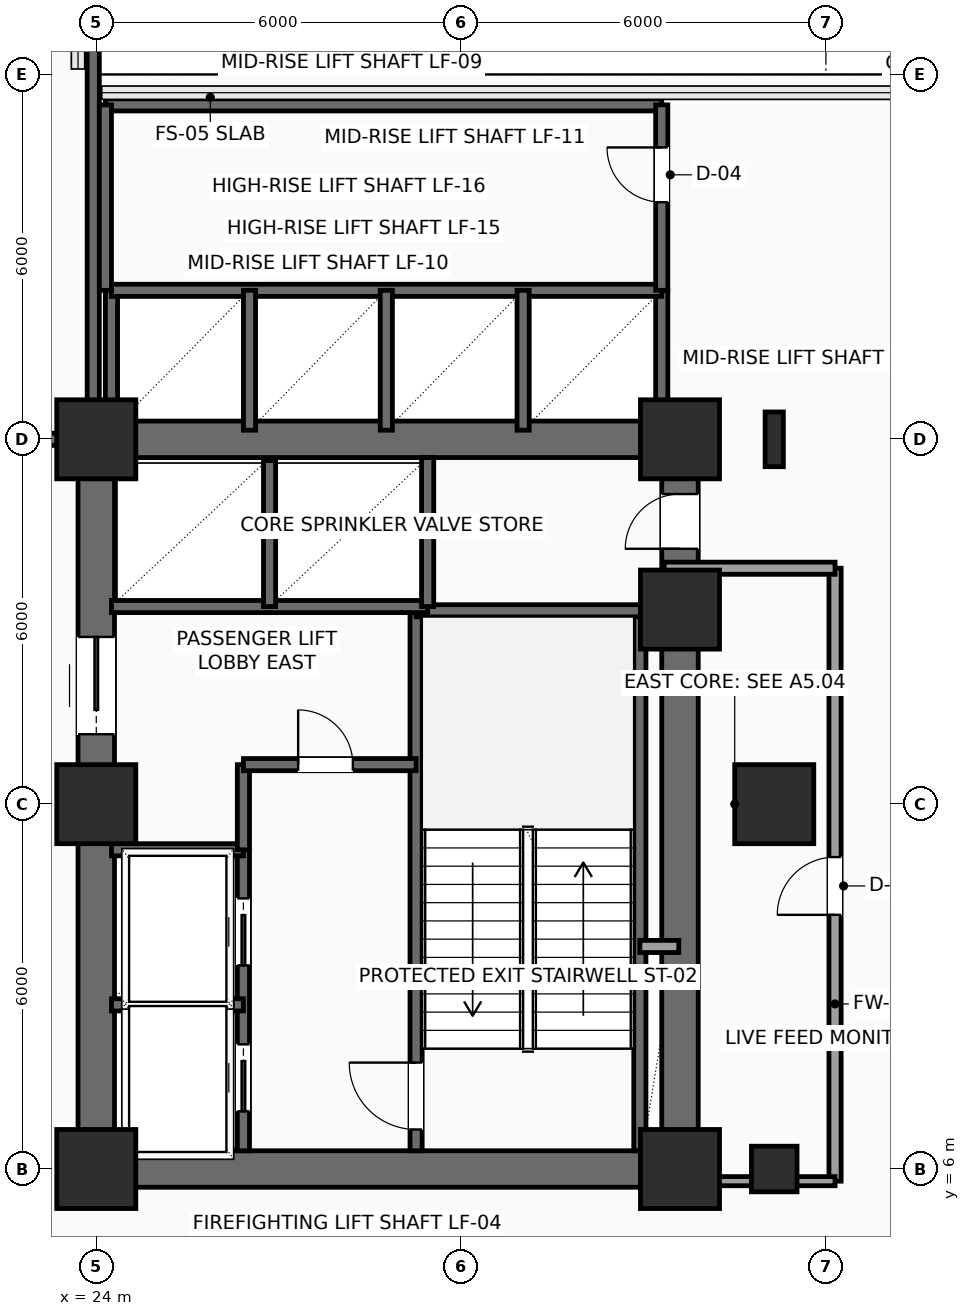
"""IFC4 building model, lengths in metres.
Left out: names, types, materials, properties, quantities, classifications, styles, units other than length and angle.
Written with IfcOpenShell. Run it as: python <this file> out.ifc"""

import sys

from ifc_helpers import new_model, si_unit, direction, frame, frame_2d, origin, origin_2d, place, context, subcontext, project, spatial, rectangle, hollow_rectangle, i_section, extrude, element, fill, save


model = new_model("IFC4")
c1 = context("Model", 3, precision=1e-05, world=origin(), true_north=direction((0.0, 1.0)))
c2 = subcontext(c1, "Body", "Model", "MODEL_VIEW")
j1 = project(units=[si_unit("LENGTHUNIT", "METRE"), si_unit("PLANEANGLEUNIT", "RADIAN")], contexts=[c1])
p1 = place(None, origin())
s1 = spatial("IfcSite", under=j1, at=p1, CompositionType="ELEMENT")
p2 = place(p1, origin())
s2 = spatial("IfcBuilding", under=s1, at=p2, CompositionType="ELEMENT")
p3 = place(p2, frame((0.0, 0.0, 63.6)))
s3 = spatial("IfcBuildingStorey", under=s2, at=p3, CompositionType="ELEMENT", Elevation=63.6)
for number, where, z_axis, x_axis in (
    (1, (24.0, 6.0, 0.0), (0.0, 0.0, 1.0), (1.0, 0.0, 0.0)),
    (2, (24.0, 12.0, 0.0), (0.0, 0.0, 1.0), (1.0, 0.0, 0.0)),
    (3, (24.0, 18.0, 0.0), (0.0, 0.0, 1.0), (1.0, 0.0, 0.0)),
    (4, (33.6, 6.0, 0.0), (0.0, 0.0, 1.0), (1.0, 0.0, 0.0)),
    (5, (33.6, 15.2, 0.0), (0.0, 0.0, 1.0), (1.0, 0.0, 0.0)),
    (6, (33.6, 18.0, 0.0), (0.0, 0.0, 1.0), (1.0, 0.0, 0.0)),
):
    element("IfcColumn", number, at=place(p3, frame(where, z_axis=z_axis, x_axis=x_axis)), inside=s3, PredefinedType="COLUMN", context=c2, shape_type="SweptSolid", body=[
        extrude(rectangle(XDim=1.3, YDim=1.3, at=origin_2d()), origin(), (0.0, 0.0, 1.0), 3.9),
    ])
p4 = place(p3, frame((35.15, 6.0, 0.0), z_axis=(0.0, 0.0, 1.0), x_axis=(1.0, 0.0, 0.0)))
e7 = element("IfcColumn", 7, at=p4, inside=s3, PredefinedType="COLUMN", context=c2, shape_type="SweptSolid", body=[
    extrude(hollow_rectangle(XDim=0.75, YDim=0.75, WallThickness=0.035, InnerFilletRadius=0.035, OuterFilletRadius=0.05, at=origin_2d()), origin(), (0.0, 0.0, 1.0), 3.9),
])
p5 = place(p3, frame((35.15, 12.0, 0.0), z_axis=(0.0, 0.0, 1.0), x_axis=(1.0, 0.0, 0.0)))
e8 = element("IfcColumn", 8, at=p5, inside=s3, PredefinedType="COLUMN", context=c2, shape_type="SweptSolid", body=[
    extrude(rectangle(XDim=1.3, YDim=1.3, at=origin_2d()), origin(), (0.0, 0.0, 1.0), 3.9),
])
p6 = place(p3, frame((35.15, 18.0, 0.0), z_axis=(0.0, 0.0, 1.0), x_axis=(1.0, 0.0, 0.0)))
e9 = element("IfcColumn", 9, at=p6, inside=s3, PredefinedType="COLUMN", context=c2, shape_type="SweptSolid", body=[
    extrude(i_section(OverallWidth=0.3, OverallDepth=0.9, WebThickness=0.019, FlangeThickness=0.035, FilletRadius=0.03, at=origin_2d()), origin(), (0.0, 0.0, 1.0), 3.9),
])
for number, where, z_axis, x_axis in (
    (10, (24.0, 6.0, 0.0), (0.0, 0.0, 1.0), (1.0, 0.0, 0.0)),
    (11, (24.0, 18.0, 0.0), (0.0, 0.0, 1.0), (1.0, 0.0, 0.0)),
):
    element("IfcWall", number, at=place(p3, frame(where, z_axis=z_axis, x_axis=x_axis)), inside=s3, PredefinedType="SHEAR", context=c2, shape_type="SweptSolid", body=[
        extrude(rectangle(XDim=9.6, YDim=0.6, at=frame_2d((4.8, 0.0))), origin(), (0.0, 0.0, 1.0), 3.65),
    ])
p7 = place(p3, frame((24.0, 6.0, 0.0), z_axis=(0.0, 0.0, 1.0), x_axis=(0.0, 1.0, 0.0)))
e12 = element("IfcWall", 12, at=p7, inside=s3, PredefinedType="SHEAR", context=c2, shape_type="SweptSolid", body=[
    extrude(rectangle(XDim=12.0, YDim=0.6, at=frame_2d((6.0, 0.0))), origin(), (0.0, 0.0, 1.0), 3.65),
])
p8 = place(p7, frame((7.15, 0.0, 0.0)))
e13 = element("IfcOpeningElement", 13, at=p8, cuts=e12, PredefinedType="OPENING", context=c2, shape_type="SweptSolid", body=[
    extrude(rectangle(XDim=1.6, YDim=2.3, at=frame_2d((0.8, 1.15))), frame((0.0, 0.31, 0.0), z_axis=(0.0, -1.0, 0.0), x_axis=(1.0, 0.0, 0.0)), (0.0, 0.0, 1.0), 0.62),
])
p9 = place(p3, frame((33.6, 6.0, 0.0), z_axis=(0.0, 0.0, 1.0), x_axis=(0.0, 1.0, 0.0)))
e14 = element("IfcWall", 14, at=p9, inside=s3, PredefinedType="SHEAR", context=c2, shape_type="SweptSolid", body=[
    extrude(rectangle(XDim=12.0, YDim=0.6, at=frame_2d((6.0, 0.0))), origin(), (0.0, 0.0, 1.0), 3.65),
])
p10 = place(p9, frame((10.2, 0.0, 0.0)))
e15 = element("IfcOpeningElement", 15, at=p10, cuts=e14, PredefinedType="OPENING", context=c2, shape_type="SweptSolid", body=[
    extrude(rectangle(XDim=0.9, YDim=2.15, at=frame_2d((0.45, 1.075))), frame((0.0, 0.31, 0.0), z_axis=(0.0, -1.0, 0.0), x_axis=(1.0, 0.0, 0.0)), (0.0, 0.0, 1.0), 0.62),
])
p11 = place(p3, frame((29.26, 6.3, 0.0), z_axis=(0.0, 0.0, 1.0), x_axis=(0.0, 1.0, 0.0)))
e16 = element("IfcWall", 16, at=p11, inside=s3, PredefinedType="SHEAR", context=c2, shape_type="SweptSolid", body=[
    extrude(rectangle(XDim=8.88, YDim=0.2, at=frame_2d((4.44, 0.0))), origin(), (0.0, 0.0, 1.0), 3.65),
])
p12 = place(p11, frame((0.35, 0.0, 0.0)))
e17 = element("IfcOpeningElement", 17, at=p12, cuts=e16, PredefinedType="OPENING", context=c2, shape_type="SweptSolid", body=[
    extrude(rectangle(XDim=1.1, YDim=2.2, at=frame_2d((0.55, 1.1))), frame((0.0, 0.11, 0.0), z_axis=(0.0, -1.0, 0.0), x_axis=(1.0, 0.0, 0.0)), (0.0, 0.0, 1.0), 0.22),
])
p13 = place(p3, frame((32.94, 6.3, 0.0), z_axis=(0.0, 0.0, 1.0), x_axis=(0.0, 1.0, 0.0)))
e18 = element("IfcWall", 18, at=p13, inside=s3, PredefinedType="SHEAR", context=c2, shape_type="SweptSolid", body=[
    extrude(rectangle(XDim=8.88, YDim=0.2, at=frame_2d((4.44, 0.0))), origin(), (0.0, 0.0, 1.0), 3.65),
])
p14 = place(p3, frame((29.26, 15.18, 0.0), z_axis=(0.0, 0.0, 1.0), x_axis=(1.0, 0.0, 0.0)))
e19 = element("IfcWall", 19, at=p14, inside=s3, PredefinedType="SHEAR", context=c2, shape_type="SweptSolid", body=[
    extrude(rectangle(XDim=4.04, YDim=0.2, at=frame_2d((2.02, 0.0))), origin(), (0.0, 0.0, 1.0), 3.65),
])
p15 = place(p3, frame((26.42, 6.3, 0.0), z_axis=(0.0, 0.0, 1.0), x_axis=(0.0, 1.0, 0.0)))
e20 = element("IfcWall", 20, at=p15, inside=s3, PredefinedType="SHEAR", context=c2, shape_type="SweptSolid", body=[
    extrude(rectangle(XDim=4.95, YDim=0.2, at=frame_2d((2.475, 0.0))), origin(), (0.0, 0.0, 1.0), 3.65),
])
p16 = place(p15, frame((0.65, 0.0, 0.0)))
e21 = element("IfcOpeningElement", 21, at=p16, cuts=e20, PredefinedType="OPENING", context=c2, shape_type="SweptSolid", body=[
    extrude(rectangle(XDim=1.1, YDim=2.2, at=frame_2d((0.55, 1.1))), frame((0.0, 0.11, 0.0), z_axis=(0.0, -1.0, 0.0), x_axis=(1.0, 0.0, 0.0)), (0.0, 0.0, 1.0), 0.22),
])
p17 = place(p15, frame((3.05, 0.0, 0.0)))
e22 = element("IfcOpeningElement", 22, at=p17, cuts=e20, PredefinedType="OPENING", context=c2, shape_type="SweptSolid", body=[
    extrude(rectangle(XDim=1.1, YDim=2.2, at=frame_2d((0.55, 1.1))), frame((0.0, 0.11, 0.0), z_axis=(0.0, -1.0, 0.0), x_axis=(1.0, 0.0, 0.0)), (0.0, 0.0, 1.0), 0.22),
])
for number, where, z_axis, x_axis in (
    (23, (24.25, 8.7, 0.0), (0.0, 0.0, 1.0), (1.0, 0.0, 0.0)),
    (24, (24.25, 11.25, 0.0), (0.0, 0.0, 1.0), (1.0, 0.0, 0.0)),
):
    element("IfcWall", number, at=place(p3, frame(where, z_axis=z_axis, x_axis=x_axis)), inside=s3, PredefinedType="SHEAR", context=c2, shape_type="SweptSolid", body=[
        extrude(rectangle(XDim=2.17, YDim=0.2, at=frame_2d((1.085, 0.0))), origin(), (0.0, 0.0, 1.0), 3.65),
    ])
p18 = place(p3, frame((26.42, 11.25, 0.0), z_axis=(0.0, 0.0, 1.0), x_axis=(0.0, 1.0, 0.0)))
e25 = element("IfcWall", 25, at=p18, inside=s3, PredefinedType="SHEAR", context=c2, shape_type="SweptSolid", body=[
    extrude(rectangle(XDim=1.4, YDim=0.2, at=frame_2d((0.7, 0.0))), origin(), (0.0, 0.0, 1.0), 3.65),
])
p19 = place(p3, frame((26.42, 12.65, 0.0), z_axis=(0.0, 0.0, 1.0), x_axis=(1.0, 0.0, 0.0)))
e26 = element("IfcWall", 26, at=p19, inside=s3, PredefinedType="SHEAR", context=c2, shape_type="SweptSolid", body=[
    extrude(rectangle(XDim=2.84, YDim=0.2, at=frame_2d((1.42, 0.0))), origin(), (0.0, 0.0, 1.0), 3.65),
])
p20 = place(p19, frame((0.9, 0.0, 0.0)))
e27 = element("IfcOpeningElement", 27, at=p20, cuts=e26, PredefinedType="OPENING", context=c2, shape_type="SweptSolid", body=[
    extrude(rectangle(XDim=0.9, YDim=2.15, at=frame_2d((0.45, 1.075))), frame((0.0, 0.11, 0.0), z_axis=(0.0, -1.0, 0.0), x_axis=(1.0, 0.0, 0.0)), (0.0, 0.0, 1.0), 0.22),
])
p21 = place(p3, frame((32.94, 9.66, 0.0), z_axis=(0.0, 0.0, 1.0), x_axis=(1.0, 0.0, 0.0)))
e28 = element("IfcWall", 28, at=p21, inside=s3, PredefinedType="SOLIDWALL", context=c2, shape_type="SweptSolid", body=[
    extrude(rectangle(XDim=0.64, YDim=0.2, at=frame_2d((0.32, 0.0))), origin(), (0.0, 0.0, 1.0), 3.65),
])
p22 = place(p3, frame((24.25, 15.25, 0.0), z_axis=(0.0, 0.0, 1.0), x_axis=(1.0, 0.0, 0.0)))
e29 = element("IfcWall", 29, at=p22, inside=s3, PredefinedType="SHEAR", context=c2, shape_type="SweptSolid", body=[
    extrude(rectangle(XDim=5.2, YDim=0.2, at=frame_2d((2.6, 0.0))), origin(), (0.0, 0.0, 1.0), 3.65),
])
p23 = place(p3, frame((26.85, 15.25, 0.0), z_axis=(0.0, 0.0, 1.0), x_axis=(0.0, 1.0, 0.0)))
e30 = element("IfcWall", 30, at=p23, inside=s3, PredefinedType="SHEAR", context=c2, shape_type="SweptSolid", body=[
    extrude(rectangle(XDim=2.4, YDim=0.2, at=frame_2d((1.2, 0.0))), origin(), (0.0, 0.0, 1.0), 3.65),
])
p24 = place(p3, frame((29.45, 15.25, 0.0), z_axis=(0.0, 0.0, 1.0), x_axis=(0.0, 1.0, 0.0)))
e31 = element("IfcWall", 31, at=p24, inside=s3, PredefinedType="SHEAR", context=c2, shape_type="SweptSolid", body=[
    extrude(rectangle(XDim=2.45, YDim=0.2, at=frame_2d((1.225, 0.0))), origin(), (0.0, 0.0, 1.0), 3.65),
])
p25 = place(p3, frame((20.45, 18.0, 0.0), z_axis=(0.0, 0.0, 1.0), x_axis=(1.0, 0.0, 0.0)))
e32 = element("IfcWall", 32, at=p25, inside=s3, PredefinedType="SHEAR", context=c2, shape_type="SweptSolid", body=[
    extrude(rectangle(XDim=3.5, YDim=0.2, at=frame_2d((1.75, 0.0))), origin(), (0.0, 0.0, 1.0), 3.65),
])
p26 = place(p25, frame((0.95, 0.0, 0.0)))
e33 = element("IfcOpeningElement", 33, at=p26, cuts=e32, PredefinedType="OPENING", context=c2, shape_type="SweptSolid", body=[
    extrude(rectangle(XDim=1.6, YDim=2.3, at=frame_2d((0.8, 1.15))), frame((0.0, 0.11, 0.0), z_axis=(0.0, -1.0, 0.0), x_axis=(1.0, 0.0, 0.0)), (0.0, 0.0, 1.0), 0.22),
])
p27 = place(p3, frame((23.95, 18.0, 0.0), z_axis=(0.0, 0.0, 1.0), x_axis=(0.0, 1.0, 0.0)))
e34 = element("IfcWall", 34, at=p27, inside=s3, PredefinedType="SHEAR", context=c2, shape_type="SweptSolid", body=[
    extrude(rectangle(XDim=9.3, YDim=0.2, at=frame_2d((4.65, 0.0))), origin(), (0.0, 0.0, 1.0), 3.65),
])
for number, where, z_axis, x_axis in (
    (35, (33.3, 18.1, 0.0), (0.0, 0.0, 1.0), (0.0, 1.0, 0.0)),
    (36, (24.25, 18.1, 0.0), (0.0, 0.0, 1.0), (0.0, 1.0, 0.0)),
):
    element("IfcWall", number, at=place(p3, frame(where, z_axis=z_axis, x_axis=x_axis)), inside=s3, PredefinedType="SHEAR", context=c2, shape_type="SweptSolid", body=[
        extrude(rectangle(XDim=2.35, YDim=0.2, at=frame_2d((1.175, 0.0))), origin(), (0.0, 0.0, 1.0), 3.65),
    ])
p28 = place(p3, frame((24.25, 20.45, 0.0), z_axis=(0.0, 0.0, 1.0), x_axis=(1.0, 0.0, 0.0)))
e37 = element("IfcWall", 37, at=p28, inside=s3, PredefinedType="SHEAR", context=c2, shape_type="SweptSolid", body=[
    extrude(rectangle(XDim=9.05, YDim=0.2, at=frame_2d((4.525, 0.0))), origin(), (0.0, 0.0, 1.0), 3.65),
])
for number, where, z_axis, x_axis in (
    (38, (26.52, 18.15, 0.0), (0.0, 0.0, 1.0), (0.0, 1.0, 0.0)),
    (39, (28.77, 18.15, 0.0), (0.0, 0.0, 1.0), (0.0, 1.0, 0.0)),
    (40, (31.02, 18.15, 0.0), (0.0, 0.0, 1.0), (0.0, 1.0, 0.0)),
):
    element("IfcWall", number, at=place(p3, frame(where, z_axis=z_axis, x_axis=x_axis)), inside=s3, PredefinedType="SHEAR", context=c2, shape_type="SweptSolid", body=[
        extrude(rectangle(XDim=2.3, YDim=0.2, at=frame_2d((1.15, 0.0))), origin(), (0.0, 0.0, 1.0), 3.65),
    ])
p29 = place(p3, frame((24.15, 23.5, 0.0), z_axis=(0.0, 0.0, 1.0), x_axis=(1.0, 0.0, 0.0)))
e41 = element("IfcWall", 41, at=p29, inside=s3, PredefinedType="SHEAR", context=c2, shape_type="SweptSolid", body=[
    extrude(rectangle(XDim=9.15, YDim=0.2, at=frame_2d((4.575, 0.0))), origin(), (0.0, 0.0, 1.0), 3.65),
])
p30 = place(p3, frame((33.3, 20.45, 0.0), z_axis=(0.0, 0.0, 1.0), x_axis=(0.0, 1.0, 0.0)))
e42 = element("IfcWall", 42, at=p30, inside=s3, PredefinedType="SHEAR", context=c2, shape_type="SweptSolid", body=[
    extrude(rectangle(XDim=3.05, YDim=0.2, at=frame_2d((1.525, 0.0))), origin(), (0.0, 0.0, 1.0), 3.65),
])
p31 = place(p30, frame((1.45, 0.0, 0.0)))
e43 = element("IfcOpeningElement", 43, at=p31, cuts=e42, PredefinedType="OPENING", context=c2, shape_type="SweptSolid", body=[
    extrude(rectangle(XDim=0.9, YDim=2.15, at=frame_2d((0.45, 1.075))), frame((0.0, 0.11, 0.0), z_axis=(0.0, -1.0, 0.0), x_axis=(1.0, 0.0, 0.0)), (0.0, 0.0, 1.0), 0.22),
])
p32 = place(p3, frame((24.15, 20.45, 0.0), z_axis=(0.0, 0.0, 1.0), x_axis=(0.0, 1.0, 0.0)))
e44 = element("IfcWall", 44, at=p32, inside=s3, PredefinedType="SHEAR", context=c2, shape_type="SweptSolid", body=[
    extrude(rectangle(XDim=3.05, YDim=0.2, at=frame_2d((1.525, 0.0))), origin(), (0.0, 0.0, 1.0), 3.65),
])
p33 = place(p3, frame((36.15, 5.8, 0.0), z_axis=(0.0, 0.0, 1.0), x_axis=(0.0, 1.0, 0.0)))
e45 = element("IfcWall", 45, at=p33, inside=s3, PredefinedType="SOLIDWALL", context=c2, shape_type="SweptSolid", body=[
    extrude(rectangle(XDim=10.08, YDim=0.2, at=frame_2d((5.04, 0.0))), origin(), (0.0, 0.0, 1.0), 3.65),
])
p34 = place(p33, frame((4.38, 0.0, 0.0)))
e46 = element("IfcOpeningElement", 46, at=p34, cuts=e45, PredefinedType="OPENING", context=c2, shape_type="SweptSolid", body=[
    extrude(rectangle(XDim=0.95, YDim=2.15, at=frame_2d((0.475, 1.075))), frame((0.0, 0.11, 0.0), z_axis=(0.0, -1.0, 0.0), x_axis=(1.0, 0.0, 0.0)), (0.0, 0.0, 1.0), 0.22),
])
p35 = place(p3, frame((36.15, 15.88, 0.0), z_axis=(0.0, 0.0, 1.0), x_axis=(-1.0, 0.0, 0.0)))
e47 = element("IfcWall", 47, at=p35, inside=s3, PredefinedType="SOLIDWALL", context=c2, shape_type="SweptSolid", body=[
    extrude(rectangle(XDim=2.81, YDim=0.2, at=frame_2d((1.405, 0.0))), origin(), (0.0, 0.0, 1.0), 3.65),
])
p36 = place(p3, frame((33.65, 5.8, 0.0), z_axis=(0.0, 0.0, 1.0), x_axis=(1.0, 0.0, 0.0)))
e48 = element("IfcWall", 48, at=p36, inside=s3, PredefinedType="PARTITIONING", context=c2, shape_type="SweptSolid", body=[
    extrude(rectangle(XDim=2.5, YDim=0.15, at=frame_2d((1.25, 0.0))), origin(), (0.0, 0.0, 1.0), 2.992),
])
p37 = place(p8, origin())
e49 = element("IfcDoor", 49, at=p37, inside=s3, OperationType="DOUBLE_DOOR_SLIDING", PredefinedType="DOOR", context=c2, shape_type="SweptSolid", body=[
    extrude(rectangle(XDim=1.6, YDim=2.3, at=frame_2d((0.8, 1.15))), frame((0.0, 0.025, 0.0), z_axis=(0.0, -1.0, 0.0), x_axis=(1.0, 0.0, 0.0)), (0.0, 0.0, 1.0), 0.05),
])
fill(e13, e49)
p38 = place(p10, origin())
e50 = element("IfcDoor", 50, at=p38, inside=s3, OperationType="SINGLE_SWING_LEFT", PredefinedType="DOOR", context=c2, shape_type="SweptSolid", body=[
    extrude(rectangle(XDim=0.9, YDim=2.15, at=frame_2d((0.45, 1.075))), frame((0.0, 0.025, 0.0), z_axis=(0.0, -1.0, 0.0), x_axis=(1.0, 0.0, 0.0)), (0.0, 0.0, 1.0), 0.05),
])
fill(e15, e50)
p39 = place(p12, origin())
e51 = element("IfcDoor", 51, at=p39, inside=s3, OperationType="SINGLE_SWING_RIGHT", PredefinedType="DOOR", context=c2, shape_type="SweptSolid", body=[
    extrude(rectangle(XDim=1.1, YDim=2.2, at=frame_2d((0.55, 1.1))), frame((0.0, 0.025, 0.0), z_axis=(0.0, -1.0, 0.0), x_axis=(1.0, 0.0, 0.0)), (0.0, 0.0, 1.0), 0.05),
])
fill(e17, e51)
p40 = place(p16, origin())
e52 = element("IfcDoor", 52, at=p40, inside=s3, OperationType="SLIDING_TO_LEFT", PredefinedType="DOOR", context=c2, shape_type="SweptSolid", body=[
    extrude(rectangle(XDim=1.1, YDim=2.2, at=frame_2d((0.55, 1.1))), frame((0.0, 0.025, 0.0), z_axis=(0.0, -1.0, 0.0), x_axis=(1.0, 0.0, 0.0)), (0.0, 0.0, 1.0), 0.05),
])
fill(e21, e52)
p41 = place(p17, origin())
e53 = element("IfcDoor", 53, at=p41, inside=s3, OperationType="SLIDING_TO_LEFT", PredefinedType="DOOR", context=c2, shape_type="SweptSolid", body=[
    extrude(rectangle(XDim=1.1, YDim=2.2, at=frame_2d((0.55, 1.1))), frame((0.0, 0.025, 0.0), z_axis=(0.0, -1.0, 0.0), x_axis=(1.0, 0.0, 0.0)), (0.0, 0.0, 1.0), 0.05),
])
fill(e22, e53)
p42 = place(p20, origin())
e54 = element("IfcDoor", 54, at=p42, inside=s3, OperationType="SINGLE_SWING_LEFT", PredefinedType="DOOR", context=c2, shape_type="SweptSolid", body=[
    extrude(rectangle(XDim=0.9, YDim=2.15, at=frame_2d((0.45, 1.075))), frame((0.0, 0.025, 0.0), z_axis=(0.0, -1.0, 0.0), x_axis=(1.0, 0.0, 0.0)), (0.0, 0.0, 1.0), 0.05),
])
fill(e27, e54)
p43 = place(p31, origin())
e55 = element("IfcDoor", 55, at=p43, inside=s3, OperationType="SINGLE_SWING_RIGHT", PredefinedType="DOOR", context=c2, shape_type="SweptSolid", body=[
    extrude(rectangle(XDim=0.9, YDim=2.15, at=frame_2d((0.45, 1.075))), frame((0.0, 0.025, 0.0), z_axis=(0.0, -1.0, 0.0), x_axis=(1.0, 0.0, 0.0)), (0.0, 0.0, 1.0), 0.05),
])
fill(e43, e55)
p44 = place(p34, origin())
e56 = element("IfcDoor", 56, at=p44, inside=s3, OperationType="SINGLE_SWING_LEFT", PredefinedType="DOOR", context=c2, shape_type="SweptSolid", body=[
    extrude(rectangle(XDim=0.95, YDim=2.15, at=frame_2d((0.475, 1.075))), frame((0.0, 0.025, 0.0), z_axis=(0.0, -1.0, 0.0), x_axis=(1.0, 0.0, 0.0)), (0.0, 0.0, 1.0), 0.05),
])
fill(e46, e56)
save(model, sys.argv[1])
